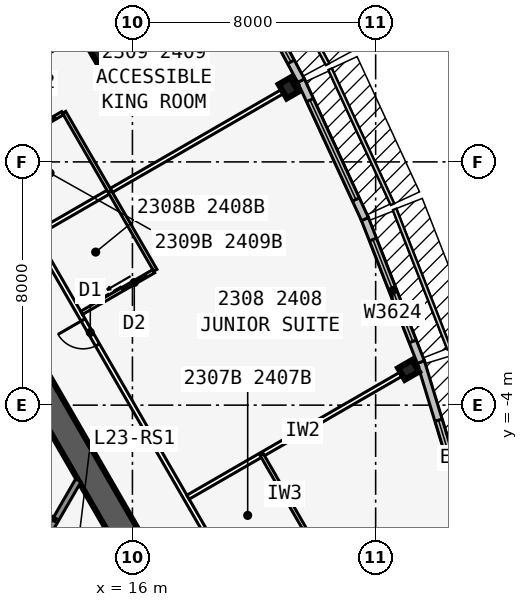
"""IFC4 building model, lengths in metres.
Left out: names, types, materials, properties, quantities, classifications, styles, units other than length and angle.
Written with IfcOpenShell. Run it as: python <this file> out.ifc"""

import sys

from ifc_helpers import new_model, si_unit, direction, frame, frame_2d, origin, origin_2d, place, context, subcontext, project, spatial, rectangle, i_section, extrude, element, fill, save


model = new_model("IFC4")
c1 = context("Model", 3, precision=1e-05, world=origin(), true_north=direction((0.0, 1.0)))
c2 = subcontext(c1, "Body", "Model", "MODEL_VIEW")
j1 = project(units=[si_unit("LENGTHUNIT", "METRE"), si_unit("PLANEANGLEUNIT", "RADIAN")], contexts=[c1])
p1 = place(None, origin())
s1 = spatial("IfcSite", under=j1, at=p1, CompositionType="ELEMENT")
p2 = place(p1, origin())
s2 = spatial("IfcBuilding", under=s1, at=p2, CompositionType="ELEMENT")
p3 = place(p2, frame((0.0, 0.0, 89.7)))
s3 = spatial("IfcBuildingStorey", under=s2, at=p3, CompositionType="ELEMENT", Elevation=89.7)
p4 = place(p3, frame((16.5, -9.526, 0.0), z_axis=(0.0, 0.0, 1.0), x_axis=(-0.499999749417, 0.866025548458, 0.0)))
e1 = element("IfcWall", 1, at=p4, inside=s3, PredefinedType="SHEAR", context=c2, shape_type="SweptSolid", body=[
    extrude(rectangle(XDim=33.0, YDim=0.9, at=frame_2d((16.5, 0.0))), origin(), (0.0, 0.0, 1.0), 3.4),
])
p5 = place(p4, frame((14.15, 0.0, 0.0)))
e2 = element("IfcOpeningElement", 2, at=p5, cuts=e1, PredefinedType="OPENING", context=c2, shape_type="SweptSolid", body=[
    extrude(rectangle(XDim=1.8, YDim=2.13, at=frame_2d((0.9, 1.065))), frame((0.0, 0.46, 0.0), z_axis=(0.0, -1.0, 0.0), x_axis=(1.0, 0.0, 0.0)), (0.0, 0.0, 1.0), 0.92),
])
p6 = place(p4, frame((12.6, 0.0, 0.0)))
e3 = element("IfcOpeningElement", 3, at=p6, cuts=e1, PredefinedType="OPENING", context=c2, shape_type="SweptSolid", body=[
    extrude(rectangle(XDim=1.0, YDim=2.13, at=frame_2d((0.5, 1.065))), frame((0.0, 0.46, 0.0), z_axis=(0.0, -1.0, 0.0), x_axis=(1.0, 0.0, 0.0)), (0.0, 0.0, 1.0), 0.92),
])
for number, where, z_axis, x_axis in (
    (4, (25.083, -2.839, 0.0), (0.0, 0.0, 1.0), (-0.5, 0.866, 0.0)),
    (5, (21.137, 6.43, 0.0), (0.0, 0.0, 1.0), (0.866, 0.5, 0.0)),
):
    element("IfcColumn", number, at=place(p3, frame(where, z_axis=z_axis, x_axis=x_axis)), inside=s3, PredefinedType="COLUMN", context=c2, shape_type="SweptSolid", body=[
        extrude(i_section(OverallWidth=0.442, OverallDepth=0.531, WebThickness=0.066, FlangeThickness=0.106, at=origin_2d()), origin(), (0.0, 0.0, 1.0), 3.4),
    ])
p7 = place(p3, frame((15.312, 8.84, 0.0), z_axis=(0.0, 0.0, 1.0), x_axis=(0.866025403784, 0.5, 0.0)))
e6 = element("IfcColumn", 6, at=p7, inside=s3, PredefinedType="COLUMN", context=c2, shape_type="SweptSolid", body=[
    extrude(rectangle(XDim=2.4, YDim=2.4, at=origin_2d()), origin(), (0.0, 0.0, 1.0), 3.4),
])
p8 = place(p3, frame((27.88, -10.429, 0.0), z_axis=(0.0, 0.0, 1.0), x_axis=(-0.2919790669, 0.956424709265, 0.0)))
e7 = element("IfcWall", 7, at=p8, inside=s3, PredefinedType="STANDARD", context=c2, shape_type="SweptSolid", body=[
    extrude(rectangle(XDim=8.211, YDim=0.25, at=frame_2d((4.105, 0.0))), origin(), (0.0, 0.0, 1.0), 3.235),
])
p9 = place(p8, frame((2.006, 0.0, 0.45)))
e8 = element("IfcOpeningElement", 8, at=p9, cuts=e7, PredefinedType="OPENING", context=c2, shape_type="SweptSolid", body=[
    extrude(rectangle(XDim=4.2, YDim=2.4, at=frame_2d((2.1, 1.2))), frame((0.0, 0.135, 0.0), z_axis=(0.0, -1.0, 0.0), x_axis=(1.0, 0.0, 0.0)), (0.0, 0.0, 1.0), 0.27),
])
p10 = place(p3, frame((25.486, -2.584, 0.0), z_axis=(0.0, 0.0, 1.0), x_axis=(-0.364013463868, 0.931393685894, 0.0)))
e9 = element("IfcWall", 9, at=p10, inside=s3, PredefinedType="STANDARD", context=c2, shape_type="SweptSolid", body=[
    extrude(rectangle(XDim=5.058, YDim=0.25, at=frame_2d((2.529, 0.0))), origin(), (0.0, 0.0, 1.0), 3.235),
])
p11 = place(p10, frame((0.729, 0.0, 0.45)))
e10 = element("IfcOpeningElement", 10, at=p11, cuts=e9, PredefinedType="OPENING", context=c2, shape_type="SweptSolid", body=[
    extrude(rectangle(XDim=3.6, YDim=2.4, at=frame_2d((1.8, 1.2))), frame((0.0, 0.135, 0.0), z_axis=(0.0, -1.0, 0.0), x_axis=(1.0, 0.0, 0.0)), (0.0, 0.0, 1.0), 0.27),
])
p12 = place(p3, frame((23.648, 2.119, 0.0), z_axis=(0.0, 0.0, 1.0), x_axis=(-0.419203100754, 0.907892482796, 0.0)))
e11 = element("IfcWall", 11, at=p12, inside=s3, PredefinedType="STANDARD", context=c2, shape_type="SweptSolid", body=[
    extrude(rectangle(XDim=5.021, YDim=0.25, at=frame_2d((2.51, 0.0))), origin(), (0.0, 0.0, 1.0), 3.235),
])
p13 = place(p12, frame((0.71, 0.0, 0.45)))
e12 = element("IfcOpeningElement", 12, at=p13, cuts=e11, PredefinedType="OPENING", context=c2, shape_type="SweptSolid", body=[
    extrude(rectangle(XDim=3.6, YDim=2.4, at=frame_2d((1.8, 1.2))), frame((0.0, 0.135, 0.0), z_axis=(0.0, -1.0, 0.0), x_axis=(1.0, 0.0, 0.0)), (0.0, 0.0, 1.0), 0.27),
])
p14 = place(p3, frame((21.547, 6.671, 0.0), z_axis=(0.0, 0.0, 1.0), x_axis=(-0.473412820489, 0.880840678782, 0.0)))
e13 = element("IfcWall", 13, at=p14, inside=s3, PredefinedType="STANDARD", context=c2, shape_type="SweptSolid", body=[
    extrude(rectangle(XDim=5.002, YDim=0.25, at=frame_2d((2.501, 0.0))), origin(), (0.0, 0.0, 1.0), 3.235),
])
p15 = place(p14, frame((0.701, 0.0, 0.45)))
e14 = element("IfcOpeningElement", 14, at=p15, cuts=e13, PredefinedType="OPENING", context=c2, shape_type="SweptSolid", body=[
    extrude(rectangle(XDim=3.6, YDim=2.4, at=frame_2d((1.8, 1.2))), frame((0.0, 0.135, 0.0), z_axis=(0.0, -1.0, 0.0), x_axis=(1.0, 0.0, 0.0)), (0.0, 0.0, 1.0), 0.27),
])
p16 = place(p3, frame((20.027, -10.985, 0.0), z_axis=(0.0, 0.0, 1.0), x_axis=(-0.500001677587, 0.866024435227, 0.0)))
e15 = element("IfcWall", 15, at=p16, inside=s3, PredefinedType="PARTITIONING", context=c2, shape_type="SweptSolid", body=[
    extrude(rectangle(XDim=39.054, YDim=0.15, at=frame_2d((19.527, 0.0))), origin(), (0.0, 0.0, 1.0), 3.235),
])
p17 = place(p16, frame((0.352, 0.0, 0.0)))
e16 = element("IfcOpeningElement", 16, at=p17, cuts=e15, PredefinedType="OPENING", context=c2, shape_type="SweptSolid", body=[
    extrude(rectangle(XDim=0.95, YDim=2.13, at=frame_2d((0.475, 1.065))), frame((0.0, 0.085, 0.0), z_axis=(0.0, -1.0, 0.0), x_axis=(1.0, 0.0, 0.0)), (0.0, 0.0, 1.0), 0.17),
])
p18 = place(p16, frame((10.352, 0.0, 0.0)))
e17 = element("IfcOpeningElement", 17, at=p18, cuts=e15, PredefinedType="OPENING", context=c2, shape_type="SweptSolid", body=[
    extrude(rectangle(XDim=0.95, YDim=2.13, at=frame_2d((0.475, 1.065))), frame((0.0, 0.085, 0.0), z_axis=(0.0, -1.0, 0.0), x_axis=(1.0, 0.0, 0.0)), (0.0, 0.0, 1.0), 0.17),
])
p19 = place(p16, frame((17.752, 0.0, 0.0)))
e18 = element("IfcOpeningElement", 18, at=p19, cuts=e15, PredefinedType="OPENING", context=c2, shape_type="SweptSolid", body=[
    extrude(rectangle(XDim=0.95, YDim=2.13, at=frame_2d((0.475, 1.065))), frame((0.0, 0.085, 0.0), z_axis=(0.0, -1.0, 0.0), x_axis=(1.0, 0.0, 0.0)), (0.0, 0.0, 1.0), 0.17),
])
p20 = place(p16, frame((26.552, 0.0, 0.0)))
e19 = element("IfcOpeningElement", 19, at=p20, cuts=e15, PredefinedType="OPENING", context=c2, shape_type="SweptSolid", body=[
    extrude(rectangle(XDim=0.95, YDim=2.13, at=frame_2d((0.475, 1.065))), frame((0.0, 0.085, 0.0), z_axis=(0.0, -1.0, 0.0), x_axis=(1.0, 0.0, 0.0)), (0.0, 0.0, 1.0), 0.17),
])
p21 = place(p16, frame((37.752, 0.0, 0.0)))
e20 = element("IfcOpeningElement", 20, at=p21, cuts=e15, PredefinedType="OPENING", context=c2, shape_type="SweptSolid", body=[
    extrude(rectangle(XDim=0.95, YDim=2.13, at=frame_2d((0.475, 1.065))), frame((0.0, 0.085, 0.0), z_axis=(0.0, -1.0, 0.0), x_axis=(1.0, 0.0, 0.0)), (0.0, 0.0, 1.0), 0.17),
])
p22 = place(p3, frame((17.829, -7.027, 0.0), z_axis=(0.0, 0.0, 1.0), x_axis=(0.866032659912, 0.499987431809, 0.0)))
e21 = element("IfcWall", 21, at=p22, inside=s3, PredefinedType="PARTITIONING", context=c2, shape_type="SweptSolid", body=[
    extrude(rectangle(XDim=8.72, YDim=0.15, at=frame_2d((4.36, 0.0))), origin(), (0.0, 0.0, 1.0), 2.389),
])
p23 = place(p3, frame((12.829, 1.633, 0.0), z_axis=(0.0, 0.0, 1.0), x_axis=(0.866026934769, 0.499997348248, 0.0)))
e22 = element("IfcWall", 22, at=p23, inside=s3, PredefinedType="PARTITIONING", context=c2, shape_type="SweptSolid", body=[
    extrude(rectangle(XDim=9.943, YDim=0.15, at=frame_2d((4.971, 0.0))), origin(), (0.0, 0.0, 1.0), 2.389),
])
p24 = place(p3, frame((10.329, 5.963, 0.0), z_axis=(0.0, 0.0, 1.0), x_axis=(0.866021688545, 0.500006434927, 0.0)))
e23 = element("IfcWall", 23, at=p24, inside=s3, PredefinedType="PARTITIONING", context=c2, shape_type="SweptSolid", body=[
    extrude(rectangle(XDim=10.096, YDim=0.15, at=frame_2d((5.048, 0.0))), origin(), (0.0, 0.0, 1.0), 2.389),
])
for number, where, z_axis, x_axis in (
    (24, (21.753, -8.225, 0.0), (0.0, 0.0, 1.0), (-0.5, 0.866, 0.0)),
    (25, (16.753, 0.435, 0.0), (0.0, 0.0, 1.0), (-0.5, 0.866, 0.0)),
):
    element("IfcWall", number, at=place(p3, frame(where, z_axis=z_axis, x_axis=x_axis)), inside=s3, PredefinedType="PLUMBINGWALL", context=c2, shape_type="SweptSolid", body=[
        extrude(rectangle(XDim=3.0, YDim=0.12, at=frame_2d((1.5, 0.0))), origin(), (0.0, 0.0, 1.0), 3.235),
    ])
p25 = place(p3, frame((14.329, -0.965, 0.0), z_axis=(0.0, 0.0, 1.0), x_axis=(0.866035715982, 0.499982138324, 0.0)))
e26 = element("IfcWall", 26, at=p25, inside=s3, PredefinedType="PLUMBINGWALL", context=c2, shape_type="SweptSolid", body=[
    extrude(rectangle(XDim=2.74, YDim=0.12, at=frame_2d((1.37, 0.0))), origin(), (0.0, 0.0, 1.0), 3.235),
])
p26 = place(p25, frame((1.55, 0.0, 0.0)))
e27 = element("IfcOpeningElement", 27, at=p26, cuts=e26, PredefinedType="OPENING", context=c2, shape_type="SweptSolid", body=[
    extrude(rectangle(XDim=0.9, YDim=2.13, at=frame_2d((0.45, 1.065))), frame((0.0, 0.07, 0.0), z_axis=(0.0, -1.0, 0.0), x_axis=(1.0, 0.0, 0.0)), (0.0, 0.0, 1.0), 0.14),
])
p27 = place(p3, frame((15.253, 3.033, 0.0), z_axis=(0.0, 0.0, 1.0), x_axis=(-0.499990139034, 0.866031096941, 0.0)))
e28 = element("IfcWall", 28, at=p27, inside=s3, PredefinedType="PLUMBINGWALL", context=c2, shape_type="SweptSolid", body=[
    extrude(rectangle(XDim=3.0, YDim=0.12, at=frame_2d((1.5, 0.0))), origin(), (0.0, 0.0, 1.0), 3.235),
])
p28 = place(p3, frame((11.329, 4.231, 0.0), z_axis=(0.0, 0.0, 1.0), x_axis=(0.866035715982, 0.499982138324, 0.0)))
e29 = element("IfcWall", 29, at=p28, inside=s3, PredefinedType="PLUMBINGWALL", context=c2, shape_type="SweptSolid", body=[
    extrude(rectangle(XDim=2.74, YDim=0.12, at=frame_2d((1.37, 0.0))), origin(), (0.0, 0.0, 1.0), 3.235),
])
p29 = place(p28, frame((1.55, 0.0, 0.0)))
e30 = element("IfcOpeningElement", 30, at=p29, cuts=e29, PredefinedType="OPENING", context=c2, shape_type="SweptSolid", body=[
    extrude(rectangle(XDim=0.9, YDim=2.13, at=frame_2d((0.45, 1.065))), frame((0.0, 0.07, 0.0), z_axis=(0.0, -1.0, 0.0), x_axis=(1.0, 0.0, 0.0)), (0.0, 0.0, 1.0), 0.14),
])
p30 = place(p3, frame((14.219, -6.476, 0.0), z_axis=(0.0, 0.0, 1.0), x_axis=(-0.499952404951, -0.866052881055, 0.0)))
e31 = element("IfcWall", 31, at=p30, inside=s3, PredefinedType="SOLIDWALL", context=c2, shape_type="SweptSolid", body=[
    extrude(rectangle(XDim=3.002, YDim=0.2, at=frame_2d((1.501, 0.0))), origin(), (0.0, 0.0, 1.0), 3.235),
])
p31 = place(p3, frame((13.469, -7.776, 0.0), z_axis=(0.0, 0.0, 1.0), x_axis=(-0.866021898093, 0.500006071987, 0.0)))
e32 = element("IfcWall", 32, at=p31, inside=s3, PredefinedType="PARTITIONING", context=c2, shape_type="SweptSolid", body=[
    extrude(rectangle(XDim=3.775, YDim=0.1, at=frame_2d((1.888, 0.0))), origin(), (0.0, 0.0, 1.0), 3.235),
])
p32 = place(p31, frame((1.815, 0.0, 0.0)))
e33 = element("IfcOpeningElement", 33, at=p32, cuts=e32, PredefinedType="OPENING", context=c2, shape_type="SweptSolid", body=[
    extrude(rectangle(XDim=0.9, YDim=2.13, at=frame_2d((0.45, 1.065))), frame((0.0, 0.06, 0.0), z_axis=(0.0, -1.0, 0.0), x_axis=(1.0, 0.0, 0.0)), (0.0, 0.0, 1.0), 0.12),
])
p33 = place(p9, origin())
e34 = element("IfcWindow", 34, at=p33, inside=s3, PartitioningType="SINGLE_PANEL", PredefinedType="WINDOW", context=c2, shape_type="SweptSolid", body=[
    extrude(rectangle(XDim=4.2, YDim=2.4, at=frame_2d((2.1, 1.2))), frame((0.0, 0.03, 0.0), z_axis=(0.0, -1.0, 0.0), x_axis=(1.0, 0.0, 0.0)), (0.0, 0.0, 1.0), 0.06),
])
fill(e8, e34)
p34 = place(p11, origin())
e35 = element("IfcWindow", 35, at=p34, inside=s3, PartitioningType="SINGLE_PANEL", PredefinedType="WINDOW", context=c2, shape_type="SweptSolid", body=[
    extrude(rectangle(XDim=3.6, YDim=2.4, at=frame_2d((1.8, 1.2))), frame((0.0, 0.03, 0.0), z_axis=(0.0, -1.0, 0.0), x_axis=(1.0, 0.0, 0.0)), (0.0, 0.0, 1.0), 0.06),
])
fill(e10, e35)
p35 = place(p13, origin())
e36 = element("IfcWindow", 36, at=p35, inside=s3, PartitioningType="SINGLE_PANEL", PredefinedType="WINDOW", context=c2, shape_type="SweptSolid", body=[
    extrude(rectangle(XDim=3.6, YDim=2.4, at=frame_2d((1.8, 1.2))), frame((0.0, 0.03, 0.0), z_axis=(0.0, -1.0, 0.0), x_axis=(1.0, 0.0, 0.0)), (0.0, 0.0, 1.0), 0.06),
])
fill(e12, e36)
p36 = place(p15, origin())
e37 = element("IfcWindow", 37, at=p36, inside=s3, PartitioningType="SINGLE_PANEL", PredefinedType="WINDOW", context=c2, shape_type="SweptSolid", body=[
    extrude(rectangle(XDim=3.6, YDim=2.4, at=frame_2d((1.8, 1.2))), frame((0.0, 0.03, 0.0), z_axis=(0.0, -1.0, 0.0), x_axis=(1.0, 0.0, 0.0)), (0.0, 0.0, 1.0), 0.06),
])
fill(e14, e37)
p37 = place(p26, origin())
e38 = element("IfcDoor", 38, at=p37, inside=s3, OperationType="SLIDING_TO_LEFT", PredefinedType="DOOR", context=c2, shape_type="SweptSolid", body=[
    extrude(rectangle(XDim=0.9, YDim=2.13, at=frame_2d((0.45, 1.065))), frame((0.0, 0.025, 0.0), z_axis=(0.0, -1.0, 0.0), x_axis=(1.0, 0.0, 0.0)), (0.0, 0.0, 1.0), 0.05),
])
fill(e27, e38)
p38 = place(p18, origin())
e39 = element("IfcDoor", 39, at=p38, inside=s3, OperationType="SINGLE_SWING_RIGHT", PredefinedType="DOOR", context=c2, shape_type="SweptSolid", body=[
    extrude(rectangle(XDim=0.95, YDim=2.13, at=frame_2d((0.475, 1.065))), frame((0.0, 0.025, 0.0), z_axis=(0.0, -1.0, 0.0), x_axis=(1.0, 0.0, 0.0)), (0.0, 0.0, 1.0), 0.05),
])
fill(e17, e39)
p39 = place(p29, origin())
e40 = element("IfcDoor", 40, at=p39, inside=s3, OperationType="SLIDING_TO_LEFT", PredefinedType="DOOR", context=c2, shape_type="SweptSolid", body=[
    extrude(rectangle(XDim=0.9, YDim=2.13, at=frame_2d((0.45, 1.065))), frame((0.0, 0.025, 0.0), z_axis=(0.0, -1.0, 0.0), x_axis=(1.0, 0.0, 0.0)), (0.0, 0.0, 1.0), 0.05),
])
fill(e30, e40)
save(model, sys.argv[1])
